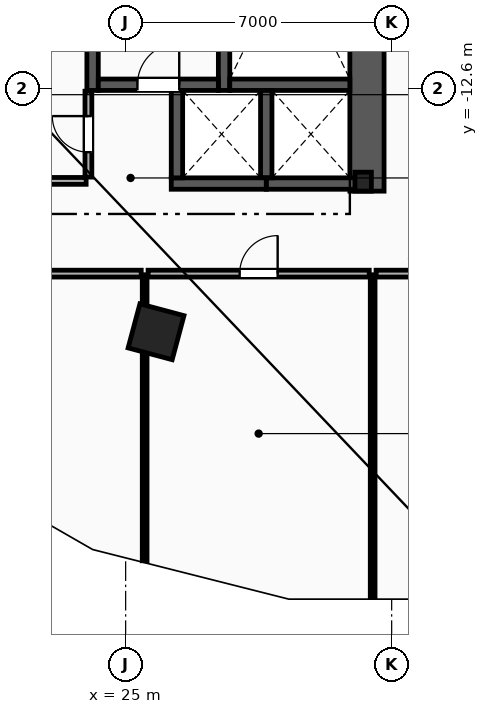
"""IFC4 building model, lengths in metres.
Left out: names, types, materials, properties, quantities, classifications, styles, units other than length and angle.
Written with IfcOpenShell. Run it as: python <this file> out.ifc"""

import sys

from ifc_helpers import new_model, si_unit, direction, frame, frame_2d, origin, origin_2d, place, context, subcontext, project, spatial, rectangle, i_section, extrude, element, fill, save


model = new_model("IFC4")
c1 = context("Model", 3, precision=1e-05, world=origin(), true_north=direction((0.0, 1.0)))
c2 = subcontext(c1, "Body", "Model", "MODEL_VIEW")
j1 = project(units=[si_unit("LENGTHUNIT", "METRE"), si_unit("PLANEANGLEUNIT", "RADIAN")], contexts=[c1])
p1 = place(None, origin())
s1 = spatial("IfcSite", under=j1, at=p1, CompositionType="ELEMENT")
p2 = place(p1, origin())
s2 = spatial("IfcBuilding", under=s1, at=p2, CompositionType="ELEMENT")
p3 = place(p2, frame((0.0, 0.0, 73.4)))
s3 = spatial("IfcBuildingStorey", under=s2, at=p3, CompositionType="ELEMENT", Elevation=73.4)
p4 = place(p3, frame((31.25, -15.05, 0.0), z_axis=(0.0, 0.0, 1.0), x_axis=(1.0, 0.0, 0.0)))
e1 = element("IfcColumn", 1, at=p4, inside=s3, PredefinedType="COLUMN", context=c2, shape_type="SweptSolid", body=[
    extrude(i_section(OverallWidth=0.432, OverallDepth=0.498, WebThickness=0.056, FlangeThickness=0.089, FilletRadius=0.018, at=origin_2d()), origin(), (0.0, 0.0, 1.0), 3.8),
])
p5 = place(p3, frame((25.8, -19.0, 0.0), z_axis=(0.0, 0.0, 1.0), x_axis=(0.965970984022, -0.258650455301, 0.0)))
e2 = element("IfcColumn", 2, at=p5, inside=s3, PredefinedType="COLUMN", context=c2, shape_type="SweptSolid", body=[
    extrude(rectangle(XDim=1.2, YDim=1.2, at=origin_2d()), origin(), (0.0, 0.0, 1.0), 3.8),
])
p6 = place(p3, frame((31.35, -15.3, 0.0), z_axis=(0.0, 0.0, 1.0), x_axis=(0.0, 1.0, 0.0)))
e3 = element("IfcWall", 3, at=p6, inside=s3, PredefinedType="SHEAR", context=c2, shape_type="SweptSolid", body=[
    extrude(rectangle(XDim=13.33, YDim=0.9, at=frame_2d((6.665, 0.0))), origin(), (0.0, 0.0, 1.0), 3.52),
])
for number, where, z_axis, x_axis in (
    (4, (27.59, -12.65, 0.0), (0.0, 0.0, 1.0), (0.0, 1.0, 0.0)),
    (5, (24.13, -12.65, 0.0), (0.0, 0.0, 1.0), (0.0, 1.0, 0.0)),
):
    element("IfcWall", number, at=place(p3, frame(where, z_axis=z_axis, x_axis=x_axis)), inside=s3, PredefinedType="SHEAR", context=c2, shape_type="SweptSolid", body=[
        extrude(rectangle(XDim=10.68, YDim=0.3, at=frame_2d((5.34, 0.0))), origin(), (0.0, 0.0, 1.0), 3.52),
    ])
p7 = place(p3, frame((27.74, -12.5, 0.0), z_axis=(0.0, 0.0, 1.0), x_axis=(1.0, 0.0, 0.0)))
e6 = element("IfcWall", 6, at=p7, inside=s3, PredefinedType="SHEAR", context=c2, shape_type="SweptSolid", body=[
    extrude(rectangle(XDim=3.16, YDim=0.3, at=frame_2d((1.58, 0.0))), origin(), (0.0, 0.0, 1.0), 3.52),
])
p8 = place(p3, frame((24.28, -12.5, 0.0), z_axis=(0.0, 0.0, 1.0), x_axis=(1.0, 0.0, 0.0)))
e7 = element("IfcWall", 7, at=p8, inside=s3, PredefinedType="SHEAR", context=c2, shape_type="SweptSolid", body=[
    extrude(rectangle(XDim=3.16, YDim=0.3, at=frame_2d((1.58, 0.0))), origin(), (0.0, 0.0, 1.0), 3.52),
])
p9 = place(p8, frame((1.03, 0.0, 0.0)))
e8 = element("IfcOpeningElement", 8, at=p9, cuts=e7, PredefinedType="OPENING", context=c2, shape_type="SweptSolid", body=[
    extrude(rectangle(XDim=1.1, YDim=2.15, at=frame_2d((0.55, 1.075))), frame((0.0, 0.16, 0.0), z_axis=(0.0, -1.0, 0.0), x_axis=(1.0, 0.0, 0.0)), (0.0, 0.0, 1.0), 0.32),
])
p10 = place(p3, frame((28.7, -15.1, 0.0), z_axis=(0.0, 0.0, 1.0), x_axis=(1.0, 0.0, 0.0)))
e9 = element("IfcWall", 9, at=p10, inside=s3, PredefinedType="SHEAR", context=c2, shape_type="SweptSolid", body=[
    extrude(rectangle(XDim=2.5, YDim=0.3, at=frame_2d((1.25, 0.0))), origin(), (0.0, 0.0, 1.0), 3.52),
])
p11 = place(p3, frame((28.7, -14.95, 0.0), z_axis=(0.0, 0.0, 1.0), x_axis=(0.0, 1.0, 0.0)))
e10 = element("IfcWall", 10, at=p11, inside=s3, PredefinedType="SHEAR", context=c2, shape_type="SweptSolid", body=[
    extrude(rectangle(XDim=2.3, YDim=0.3, at=frame_2d((1.15, 0.0))), origin(), (0.0, 0.0, 1.0), 3.52),
])
p12 = place(p3, frame((26.2, -15.1, 0.0), z_axis=(0.0, 0.0, 1.0), x_axis=(1.0, 0.0, 0.0)))
e11 = element("IfcWall", 11, at=p12, inside=s3, PredefinedType="SHEAR", context=c2, shape_type="SweptSolid", body=[
    extrude(rectangle(XDim=2.5, YDim=0.3, at=frame_2d((1.25, 0.0))), origin(), (0.0, 0.0, 1.0), 3.52),
])
p13 = place(p3, frame((26.35, -14.95, 0.0), z_axis=(0.0, 0.0, 1.0), x_axis=(0.0, 1.0, 0.0)))
e12 = element("IfcWall", 12, at=p13, inside=s3, PredefinedType="SHEAR", context=c2, shape_type="SweptSolid", body=[
    extrude(rectangle(XDim=2.3, YDim=0.3, at=frame_2d((1.15, 0.0))), origin(), (0.0, 0.0, 1.0), 3.52),
])
p14 = place(p3, frame((21.35, -15.03, 0.0), z_axis=(0.0, 0.0, 1.0), x_axis=(1.0, 0.0, 0.0)))
e13 = element("IfcWall", 13, at=p14, inside=s3, PredefinedType="PARTITIONING", context=c2, shape_type="SweptSolid", body=[
    extrude(rectangle(XDim=2.61, YDim=0.18, at=frame_2d((1.305, 0.0))), origin(), (0.0, 0.0, 1.0), 2.593),
])
p15 = place(p3, frame((24.02, -14.93, 0.0), z_axis=(0.0, 0.0, 1.0), x_axis=(0.0, 1.0, 0.0)))
e14 = element("IfcWall", 14, at=p15, inside=s3, PredefinedType="PARTITIONING", context=c2, shape_type="SweptSolid", body=[
    extrude(rectangle(XDim=2.26, YDim=0.18, at=frame_2d((1.13, 0.0))), origin(), (0.0, 0.0, 1.0), 3.52),
])
p16 = place(p15, frame((0.655, 0.0, 0.0)))
e15 = element("IfcOpeningElement", 15, at=p16, cuts=e14, PredefinedType="OPENING", context=c2, shape_type="SweptSolid", body=[
    extrude(rectangle(XDim=0.95, YDim=2.1, at=frame_2d((0.475, 1.05))), frame((0.0, 0.1, 0.0), z_axis=(0.0, -1.0, 0.0), x_axis=(1.0, 0.0, 0.0)), (0.0, 0.0, 1.0), 0.2),
])
p17 = place(p3, frame((25.5, -25.025, 0.0), z_axis=(0.0, 0.0, 1.0), x_axis=(0.0, 1.0, 0.0)))
e16 = element("IfcWall", 16, at=p17, inside=s3, PredefinedType="PARTITIONING", context=c2, shape_type="SweptSolid", body=[
    extrude(rectangle(XDim=7.525, YDim=0.125, at=frame_2d((3.762, 0.0))), origin(), (0.0, 0.0, 1.0), 3.52),
])
p18 = place(p3, frame((31.5, -25.985, 0.0), z_axis=(0.0, 0.0, 1.0), x_axis=(0.0, 1.0, 0.0)))
e17 = element("IfcWall", 17, at=p18, inside=s3, PredefinedType="PARTITIONING", context=c2, shape_type="SweptSolid", body=[
    extrude(rectangle(XDim=8.485, YDim=0.125, at=frame_2d((4.243, 0.0))), origin(), (0.0, 0.0, 1.0), 3.52),
])
p19 = place(p3, frame((25.59, -17.47, 0.0), z_axis=(0.0, 0.0, 1.0), x_axis=(1.0, 0.0, 0.0)))
e18 = element("IfcWall", 18, at=p19, inside=s3, PredefinedType="PARTITIONING", context=c2, shape_type="SweptSolid", body=[
    extrude(rectangle(XDim=5.82, YDim=0.18, at=frame_2d((2.91, 0.0))), origin(), (0.0, 0.0, 1.0), 3.52),
])
p20 = place(p19, frame((2.41, 0.0, 0.0)))
e19 = element("IfcOpeningElement", 19, at=p20, cuts=e18, PredefinedType="OPENING", context=c2, shape_type="SweptSolid", body=[
    extrude(rectangle(XDim=1.0, YDim=2.15, at=frame_2d((0.5, 1.075))), frame((0.0, 0.1, 0.0), z_axis=(0.0, -1.0, 0.0), x_axis=(1.0, 0.0, 0.0)), (0.0, 0.0, 1.0), 0.2),
])
p21 = place(p3, frame((16.822, -17.47, 0.0), z_axis=(0.0, 0.0, 1.0), x_axis=(1.0, 0.0, 0.0)))
e20 = element("IfcWall", 20, at=p21, inside=s3, PredefinedType="PARTITIONING", context=c2, shape_type="SweptSolid", body=[
    extrude(rectangle(XDim=8.588, YDim=0.18, at=frame_2d((4.294, 0.0))), origin(), (0.0, 0.0, 1.0), 3.52),
])
p22 = place(p3, frame((31.59, -17.47, 0.0), z_axis=(0.0, 0.0, 1.0), x_axis=(1.0, 0.0, 0.0)))
e21 = element("IfcWall", 21, at=p22, inside=s3, PredefinedType="PARTITIONING", context=c2, shape_type="SweptSolid", body=[
    extrude(rectangle(XDim=2.038, YDim=0.18, at=frame_2d((1.019, 0.0))), origin(), (0.0, 0.0, 1.0), 3.52),
])
p23 = place(p9, origin())
e22 = element("IfcDoor", 22, at=p23, inside=s3, OperationType="SINGLE_SWING_RIGHT", PredefinedType="DOOR", context=c2, shape_type="SweptSolid", body=[
    extrude(rectangle(XDim=1.1, YDim=2.15, at=frame_2d((0.55, 1.075))), frame((0.0, 0.025, 0.0), z_axis=(0.0, -1.0, 0.0), x_axis=(1.0, 0.0, 0.0)), (0.0, 0.0, 1.0), 0.05),
])
fill(e8, e22)
p24 = place(p20, origin())
e23 = element("IfcDoor", 23, at=p24, inside=s3, OperationType="SINGLE_SWING_RIGHT", PredefinedType="DOOR", context=c2, shape_type="SweptSolid", body=[
    extrude(rectangle(XDim=1.0, YDim=2.15, at=frame_2d((0.5, 1.075))), frame((0.0, 0.025, 0.0), z_axis=(0.0, -1.0, 0.0), x_axis=(1.0, 0.0, 0.0)), (0.0, 0.0, 1.0), 0.05),
])
fill(e19, e23)
p25 = place(p16, origin())
e24 = element("IfcDoor", 24, at=p25, inside=s3, OperationType="SINGLE_SWING_RIGHT", PredefinedType="DOOR", context=c2, shape_type="SweptSolid", body=[
    extrude(rectangle(XDim=0.95, YDim=2.1, at=frame_2d((0.475, 1.05))), frame((0.0, 0.025, 0.0), z_axis=(0.0, -1.0, 0.0), x_axis=(1.0, 0.0, 0.0)), (0.0, 0.0, 1.0), 0.05),
])
fill(e15, e24)
save(model, sys.argv[1])
